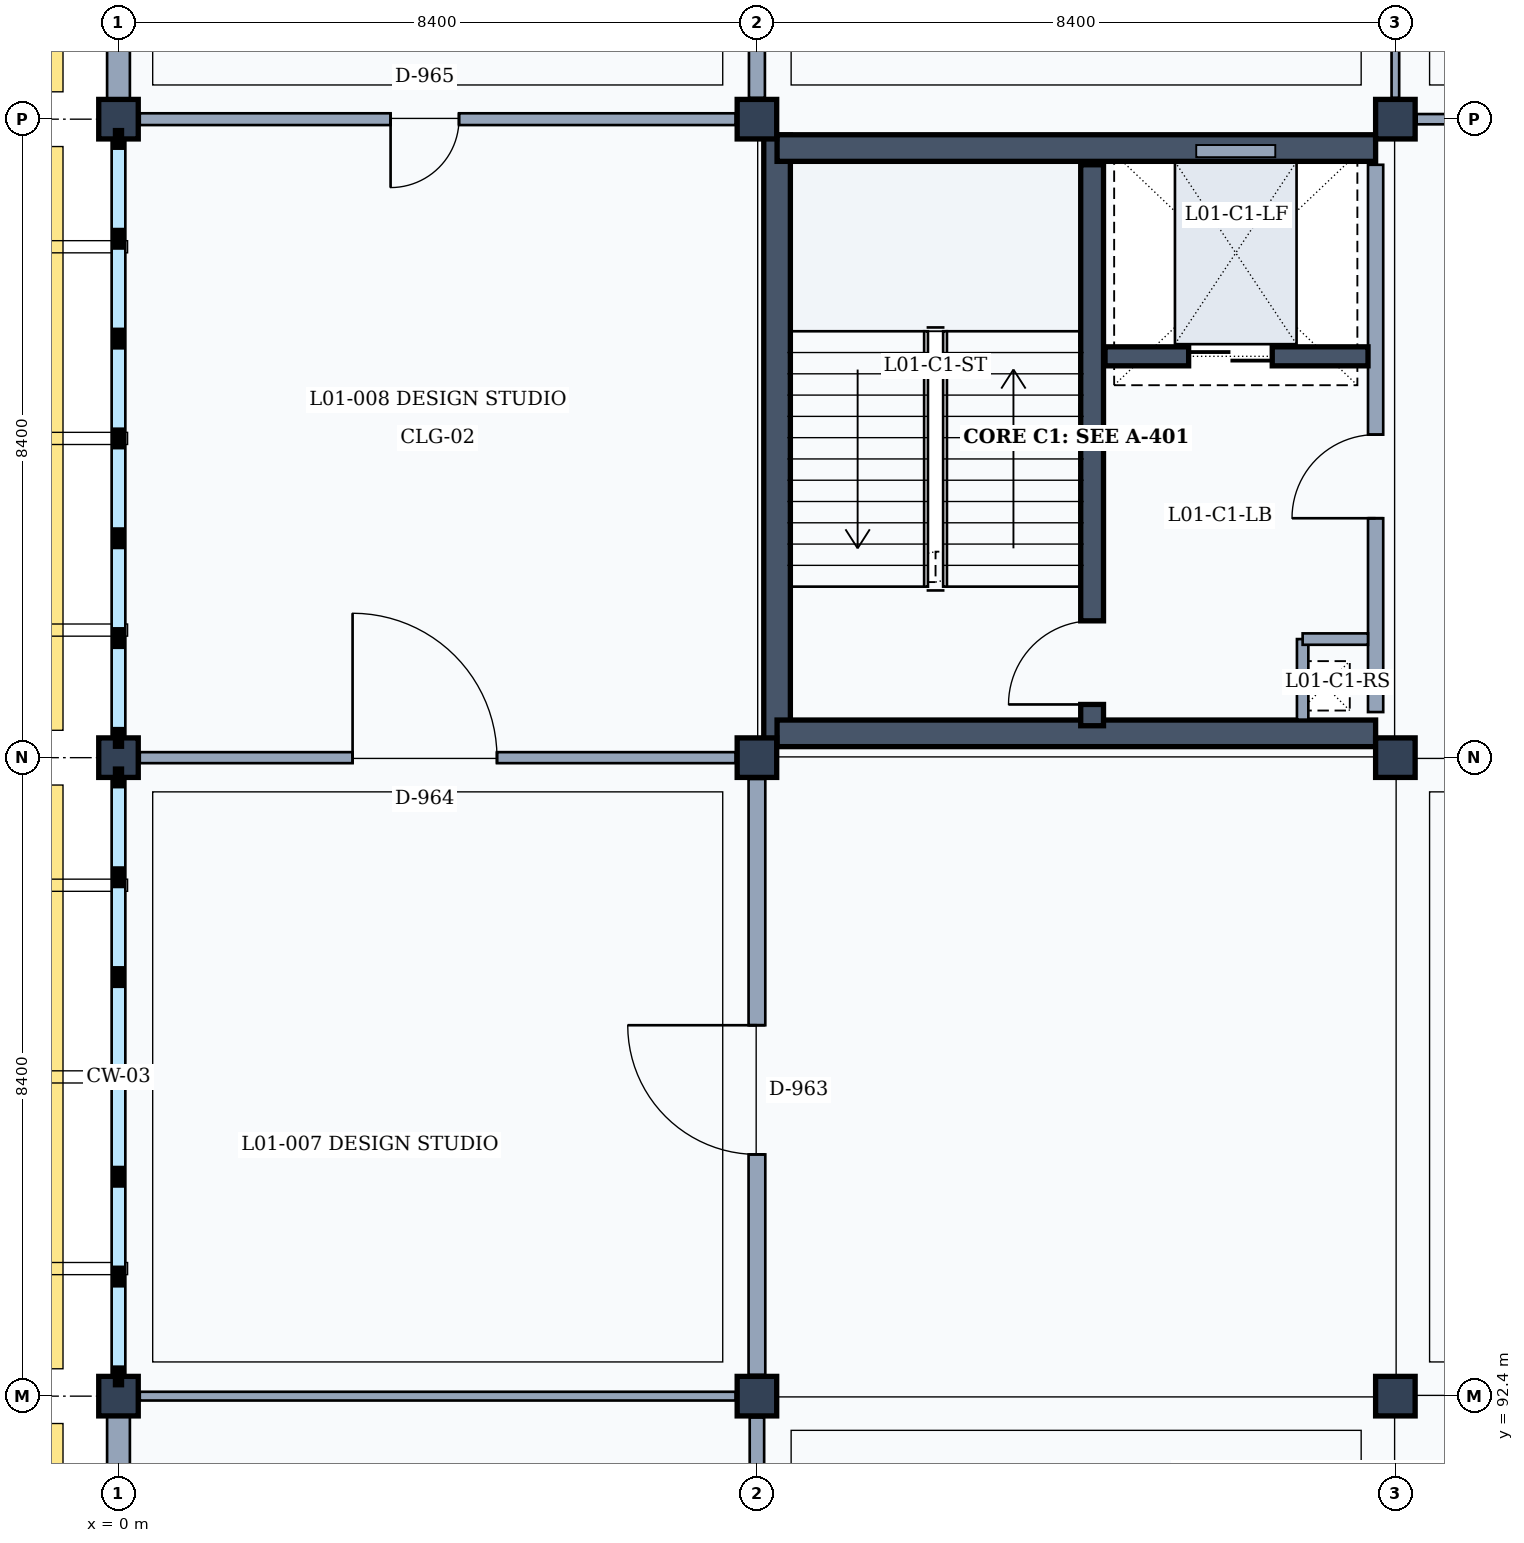
"""IFC4 building model, lengths in metres.
Left out: names, types, materials, properties, quantities, classifications, styles, units other than length and angle.
Written with IfcOpenShell. Run it as: python <this file> out.ifc"""

import sys

from ifc_helpers import new_model, si_unit, direction, frame, frame_2d, origin, origin_2d, place, context, subcontext, project, spatial, rectangle, extrude, element, fill, save


model = new_model("IFC4")
c1 = context("Model", 3, precision=1e-05, world=origin(), true_north=direction((0.0, 1.0)))
c2 = subcontext(c1, "Body", "Model", "MODEL_VIEW")
j1 = project(units=[si_unit("LENGTHUNIT", "METRE"), si_unit("PLANEANGLEUNIT", "RADIAN")], contexts=[c1])
p1 = place(None, origin())
s1 = spatial("IfcSite", under=j1, at=p1, CompositionType="ELEMENT")
p2 = place(p1, origin())
s2 = spatial("IfcBuilding", under=s1, at=p2, CompositionType="ELEMENT")
p3 = place(p2, frame((0.0, 0.0, 4.8)))
s3 = spatial("IfcBuildingStorey", under=s2, at=p3, CompositionType="ELEMENT", Elevation=4.8)
for number, where, z_axis, x_axis in (
    (1, (0.0, 92.4, 0.0), (0.0, 0.0, 1.0), (1.0, 0.0, 0.0)),
    (2, (0.0, 100.8, 0.0), (0.0, 0.0, 1.0), (1.0, 0.0, 0.0)),
    (3, (0.0, 109.2, 0.0), (0.0, 0.0, 1.0), (1.0, 0.0, 0.0)),
    (4, (8.4, 92.4, 0.0), (0.0, 0.0, 1.0), (1.0, 0.0, 0.0)),
    (5, (8.4, 100.8, 0.0), (0.0, 0.0, 1.0), (1.0, 0.0, 0.0)),
    (6, (8.4, 109.2, 0.0), (0.0, 0.0, 1.0), (1.0, 0.0, 0.0)),
    (7, (16.8, 92.4, 0.0), (0.0, 0.0, 1.0), (1.0, 0.0, 0.0)),
    (8, (16.8, 100.8, 0.0), (0.0, 0.0, 1.0), (1.0, 0.0, 0.0)),
    (9, (16.8, 109.2, 0.0), (0.0, 0.0, 1.0), (1.0, 0.0, 0.0)),
):
    element("IfcColumn", number, at=place(p3, frame(where, z_axis=z_axis, x_axis=x_axis)), inside=s3, PredefinedType="COLUMN", context=c2, shape_type="SweptSolid", body=[
        extrude(rectangle(XDim=0.52, YDim=0.52, at=origin_2d()), origin(), (0.0, 0.0, 1.0), 4.8),
    ])
p4 = place(p3, frame((0.0, 84.26, 0.0), z_axis=(0.0, 0.0, 1.0), x_axis=(0.0, 1.0, 0.0)))
e10 = element("IfcWall", 10, at=p4, inside=s3, PredefinedType="SOLIDWALL", context=c2, shape_type="SweptSolid", body=[
    extrude(rectangle(XDim=7.88, YDim=0.3, at=frame_2d((3.94, 0.0))), origin(), (0.0, 0.0, 1.0), 3.96),
])
p5 = place(p4, frame((3.29, 0.0, 0.9)))
e11 = element("IfcOpeningElement", 11, at=p5, cuts=e10, PredefinedType="OPENING", context=c2, shape_type="SweptSolid", body=[
    extrude(rectangle(XDim=1.3, YDim=1.75, at=frame_2d((0.65, 0.875))), frame((0.0, 0.16, 0.0), z_axis=(0.0, -1.0, 0.0), x_axis=(1.0, 0.0, 0.0)), (0.0, 0.0, 1.0), 0.32),
])
p6 = place(p3, frame((0.0, 109.46, 0.0), z_axis=(0.0, 0.0, 1.0), x_axis=(0.0, 1.0, 0.0)))
e12 = element("IfcWall", 12, at=p6, inside=s3, PredefinedType="SOLIDWALL", context=c2, shape_type="SweptSolid", body=[
    extrude(rectangle(XDim=7.88, YDim=0.3, at=frame_2d((3.94, 0.0))), origin(), (0.0, 0.0, 1.0), 3.96),
])
p7 = place(p6, frame((2.99, 0.0, 0.9)))
e13 = element("IfcOpeningElement", 13, at=p7, cuts=e12, PredefinedType="OPENING", context=c2, shape_type="SweptSolid", body=[
    extrude(rectangle(XDim=1.9, YDim=2.05, at=frame_2d((0.95, 1.025))), frame((0.0, 0.16, 0.0), z_axis=(0.0, -1.0, 0.0), x_axis=(1.0, 0.0, 0.0)), (0.0, 0.0, 1.0), 0.32),
])
p8 = place(p3, frame((8.665, 101.05, 0.0), z_axis=(0.0, 0.0, 1.0), x_axis=(0.0, 1.0, 0.0)))
e14 = element("IfcWall", 14, at=p8, inside=s3, PredefinedType="SHEAR", context=c2, shape_type="SweptSolid", body=[
    extrude(rectangle(XDim=7.94, YDim=0.35, at=frame_2d((3.97, 0.0))), origin(), (0.0, 0.0, 1.0), 4.56),
])
p9 = place(p3, frame((8.665, 108.82, 0.0), z_axis=(0.0, 0.0, 1.0), x_axis=(1.0, 0.0, 0.0)))
e15 = element("IfcWall", 15, at=p9, inside=s3, PredefinedType="SHEAR", context=c2, shape_type="SweptSolid", body=[
    extrude(rectangle(XDim=7.875, YDim=0.35, at=frame_2d((3.938, 0.0))), origin(), (0.0, 0.0, 1.0), 4.56),
])
p10 = place(p3, frame((16.54, 108.6, 0.0), z_axis=(0.0, 0.0, 1.0), x_axis=(0.0, -1.0, 0.0)))
e16 = element("IfcWall", 16, at=p10, inside=s3, PredefinedType="PARTITIONING", context=c2, shape_type="SweptSolid", body=[
    extrude(rectangle(XDim=7.2, YDim=0.2, at=frame_2d((3.6, 0.0))), origin(), (0.0, 0.0, 1.0), 3.92),
])
p11 = place(p10, frame((3.55, 0.0, 0.0)))
e17 = element("IfcOpeningElement", 17, at=p11, cuts=e16, PredefinedType="OPENING", context=c2, shape_type="SweptSolid", body=[
    extrude(rectangle(XDim=1.1, YDim=2.15, at=frame_2d((0.55, 1.075))), frame((0.0, 0.11, 0.0), z_axis=(0.0, -1.0, 0.0), x_axis=(1.0, 0.0, 0.0)), (0.0, 0.0, 1.0), 0.22),
])
p12 = place(p3, frame((16.54, 101.12, 0.0), z_axis=(0.0, 0.0, 1.0), x_axis=(-1.0, 0.0, 0.0)))
e18 = element("IfcWall", 18, at=p12, inside=s3, PredefinedType="SHEAR", context=c2, shape_type="SweptSolid", body=[
    extrude(rectangle(XDim=7.875, YDim=0.35, at=frame_2d((3.938, 0.0))), origin(), (0.0, 0.0, 1.0), 4.56),
])
p13 = place(p3, frame((12.81, 101.22, 0.0), z_axis=(0.0, 0.0, 1.0), x_axis=(0.0, 1.0, 0.0)))
e19 = element("IfcWall", 19, at=p13, inside=s3, PredefinedType="SHEAR", context=c2, shape_type="SweptSolid", body=[
    extrude(rectangle(XDim=7.38, YDim=0.3, at=frame_2d((3.69, 0.0))), origin(), (0.0, 0.0, 1.0), 4.56),
])
p14 = place(p13, frame((0.28, 0.0, 0.0)))
e20 = element("IfcOpeningElement", 20, at=p14, cuts=e19, PredefinedType="OPENING", context=c2, shape_type="SweptSolid", body=[
    extrude(rectangle(XDim=1.1, YDim=2.15, at=frame_2d((0.55, 1.075))), frame((0.0, 0.16, 0.0), z_axis=(0.0, -1.0, 0.0), x_axis=(1.0, 0.0, 0.0)), (0.0, 0.0, 1.0), 0.32),
])
p15 = place(p3, frame((15.58, 102.36, 0.0), z_axis=(0.0, 0.0, 1.0), x_axis=(0.0, -1.0, 0.0)))
e21 = element("IfcWall", 21, at=p15, inside=s3, PredefinedType="PARTITIONING", context=c2, shape_type="SweptSolid", body=[
    extrude(rectangle(XDim=1.06, YDim=0.15, at=frame_2d((0.53, 0.0))), origin(), (0.0, 0.0, 1.0), 3.92),
])
p16 = place(p3, frame((15.58, 102.36, 0.0), z_axis=(0.0, 0.0, 1.0), x_axis=(1.0, 0.0, 0.0)))
e22 = element("IfcWall", 22, at=p16, inside=s3, PredefinedType="PARTITIONING", context=c2, shape_type="SweptSolid", body=[
    extrude(rectangle(XDim=0.86, YDim=0.15, at=frame_2d((0.43, 0.0))), origin(), (0.0, 0.0, 1.0), 3.92),
])
p17 = place(p3, frame((12.98, 106.08, 0.0), z_axis=(0.0, 0.0, 1.0), x_axis=(1.0, 0.0, 0.0)))
e23 = element("IfcWall", 23, at=p17, inside=s3, PredefinedType="SHEAR", context=c2, shape_type="SweptSolid", body=[
    extrude(rectangle(XDim=3.46, YDim=0.25, at=frame_2d((1.73, 0.0))), origin(), (0.0, 0.0, 1.0), 4.56),
])
p18 = place(p17, frame((1.1, 0.0, 0.0)))
e24 = element("IfcOpeningElement", 24, at=p18, cuts=e23, PredefinedType="OPENING", context=c2, shape_type="SweptSolid", body=[
    extrude(rectangle(XDim=1.1, YDim=2.15, at=frame_2d((0.55, 1.075))), frame((0.0, 0.135, 0.0), z_axis=(0.0, -1.0, 0.0), x_axis=(1.0, 0.0, 0.0)), (0.0, 0.0, 1.0), 0.27),
])
p19 = place(p3, frame((8.4, 84.28, 0.0), z_axis=(0.0, 0.0, 1.0), x_axis=(0.0, 1.0, 0.0)))
e25 = element("IfcWall", 25, at=p19, inside=s3, PredefinedType="PARTITIONING", context=c2, shape_type="SweptSolid", body=[
    extrude(rectangle(XDim=7.84, YDim=0.19, at=frame_2d((3.92, 0.0))), origin(), (0.0, 0.0, 1.0), 3.92),
])
p20 = place(p19, frame((2.975, 0.0, 0.0)))
e26 = element("IfcOpeningElement", 26, at=p20, cuts=e25, PredefinedType="OPENING", context=c2, shape_type="SweptSolid", body=[
    extrude(rectangle(XDim=1.55, YDim=2.35, at=frame_2d((0.775, 1.175))), frame((0.0, 0.105, 0.0), z_axis=(0.0, -1.0, 0.0), x_axis=(1.0, 0.0, 0.0)), (0.0, 0.0, 1.0), 0.21),
])
p21 = place(p3, frame((0.28, 92.4, 0.0), z_axis=(0.0, 0.0, 1.0), x_axis=(1.0, 0.0, 0.0)))
e27 = element("IfcWall", 27, at=p21, inside=s3, PredefinedType="PARTITIONING", context=c2, shape_type="SweptSolid", body=[
    extrude(rectangle(XDim=7.84, YDim=0.115, at=frame_2d((3.92, 0.0))), origin(), (0.0, 0.0, 1.0), 3.92),
])
p22 = place(p3, frame((8.4, 92.68, 0.0), z_axis=(0.0, 0.0, 1.0), x_axis=(0.0, 1.0, 0.0)))
e28 = element("IfcWall", 28, at=p22, inside=s3, PredefinedType="PARTITIONING", context=c2, shape_type="SweptSolid", body=[
    extrude(rectangle(XDim=7.84, YDim=0.22, at=frame_2d((3.92, 0.0))), origin(), (0.0, 0.0, 1.0), 3.92),
])
p23 = place(p22, frame((2.9, 0.0, 0.0)))
e29 = element("IfcOpeningElement", 29, at=p23, cuts=e28, PredefinedType="OPENING", context=c2, shape_type="SweptSolid", body=[
    extrude(rectangle(XDim=1.7, YDim=2.3, at=frame_2d((0.85, 1.15))), frame((0.0, 0.12, 0.0), z_axis=(0.0, -1.0, 0.0), x_axis=(1.0, 0.0, 0.0)), (0.0, 0.0, 1.0), 0.24),
])
p24 = place(p3, frame((0.28, 100.8, 0.0), z_axis=(0.0, 0.0, 1.0), x_axis=(1.0, 0.0, 0.0)))
e30 = element("IfcWall", 30, at=p24, inside=s3, PredefinedType="PARTITIONING", context=c2, shape_type="SweptSolid", body=[
    extrude(rectangle(XDim=7.84, YDim=0.145, at=frame_2d((3.92, 0.0))), origin(), (0.0, 0.0, 1.0), 3.92),
])
p25 = place(p24, frame((2.8, 0.0, 0.0)))
e31 = element("IfcOpeningElement", 31, at=p25, cuts=e30, PredefinedType="OPENING", context=c2, shape_type="SweptSolid", body=[
    extrude(rectangle(XDim=1.9, YDim=2.4, at=frame_2d((0.95, 1.2))), frame((0.0, 0.083, 0.0), z_axis=(0.0, -1.0, 0.0), x_axis=(1.0, 0.0, 0.0)), (0.0, 0.0, 1.0), 0.165),
])
p26 = place(p3, frame((0.28, 109.2, 0.0), z_axis=(0.0, 0.0, 1.0), x_axis=(1.0, 0.0, 0.0)))
e32 = element("IfcWall", 32, at=p26, inside=s3, PredefinedType="PARTITIONING", context=c2, shape_type="SweptSolid", body=[
    extrude(rectangle(XDim=7.84, YDim=0.155, at=frame_2d((3.92, 0.0))), origin(), (0.0, 0.0, 1.0), 3.92),
])
p27 = place(p26, frame((3.3, 0.0, 0.0)))
e33 = element("IfcOpeningElement", 33, at=p27, cuts=e32, PredefinedType="OPENING", context=c2, shape_type="SweptSolid", body=[
    extrude(rectangle(XDim=0.9, YDim=2.1, at=frame_2d((0.45, 1.05))), frame((0.0, 0.087, 0.0), z_axis=(0.0, -1.0, 0.0), x_axis=(1.0, 0.0, 0.0)), (0.0, 0.0, 1.0), 0.175),
])
p28 = place(p3, frame((8.4, 109.48, 0.0), z_axis=(0.0, 0.0, 1.0), x_axis=(0.0, 1.0, 0.0)))
e34 = element("IfcWall", 34, at=p28, inside=s3, PredefinedType="PARTITIONING", context=c2, shape_type="SweptSolid", body=[
    extrude(rectangle(XDim=7.84, YDim=0.21, at=frame_2d((3.92, 0.0))), origin(), (0.0, 0.0, 1.0), 3.92),
])
p29 = place(p3, frame((16.8, 109.48, 0.0), z_axis=(0.0, 0.0, 1.0), x_axis=(0.0, 1.0, 0.0)))
e35 = element("IfcWall", 35, at=p29, inside=s3, PredefinedType="MOVABLE", context=c2, shape_type="SweptSolid", body=[
    extrude(rectangle(XDim=7.84, YDim=0.1, at=frame_2d((3.92, 0.0))), origin(), (0.0, 0.0, 1.0), 3.92),
])
p30 = place(p29, frame((3.15, 0.0, 0.0)))
e36 = element("IfcOpeningElement", 36, at=p30, cuts=e35, PredefinedType="OPENING", context=c2, shape_type="SweptSolid", body=[
    extrude(rectangle(XDim=1.2, YDim=2.2, at=frame_2d((0.6, 1.1))), frame((0.0, 0.06, 0.0), z_axis=(0.0, -1.0, 0.0), x_axis=(1.0, 0.0, 0.0)), (0.0, 0.0, 1.0), 0.12),
])
p31 = place(p3, frame((17.08, 109.2, 0.0), z_axis=(0.0, 0.0, 1.0), x_axis=(1.0, 0.0, 0.0)))
e37 = element("IfcWall", 37, at=p31, inside=s3, PredefinedType="PARTITIONING", context=c2, shape_type="SweptSolid", body=[
    extrude(rectangle(XDim=7.84, YDim=0.135, at=frame_2d((3.92, 0.0))), origin(), (0.0, 0.0, 1.0), 3.92),
])
p32 = place(p31, frame((3.3, 0.0, 0.0)))
e38 = element("IfcOpeningElement", 38, at=p32, cuts=e37, PredefinedType="OPENING", context=c2, shape_type="SweptSolid", body=[
    extrude(rectangle(XDim=0.9, YDim=2.1, at=frame_2d((0.45, 1.05))), frame((0.0, 0.077, 0.0), z_axis=(0.0, -1.0, 0.0), x_axis=(1.0, 0.0, 0.0)), (0.0, 0.0, 1.0), 0.155),
])
p33 = place(p11, frame((1.1, 0.0, 0.0), z_axis=(0.0, 0.0, 1.0), x_axis=(-1.0, 0.0, 0.0)))
e39 = element("IfcDoor", 39, at=p33, inside=s3, OperationType="SINGLE_SWING_LEFT", PredefinedType="DOOR", context=c2, shape_type="SweptSolid", body=[
    extrude(rectangle(XDim=1.1, YDim=2.15, at=frame_2d((0.55, 1.075))), frame((0.0, 0.025, 0.0), z_axis=(0.0, -1.0, 0.0), x_axis=(1.0, 0.0, 0.0)), (0.0, 0.0, 1.0), 0.05),
])
fill(e17, e39)
p34 = place(p14, origin())
e40 = element("IfcDoor", 40, at=p34, inside=s3, OperationType="SINGLE_SWING_LEFT", PredefinedType="DOOR", context=c2, shape_type="SweptSolid", body=[
    extrude(rectangle(XDim=1.1, YDim=2.15, at=frame_2d((0.55, 1.075))), frame((0.0, 0.025, 0.0), z_axis=(0.0, -1.0, 0.0), x_axis=(1.0, 0.0, 0.0)), (0.0, 0.0, 1.0), 0.05),
])
fill(e20, e40)
p35 = place(p18, origin())
e41 = element("IfcDoor", 41, at=p35, inside=s3, OperationType="DOUBLE_DOOR_SLIDING", PredefinedType="DOOR", context=c2, shape_type="SweptSolid", body=[
    extrude(rectangle(XDim=1.1, YDim=2.15, at=frame_2d((0.55, 1.075))), frame((0.0, 0.025, 0.0), z_axis=(0.0, -1.0, 0.0), x_axis=(1.0, 0.0, 0.0)), (0.0, 0.0, 1.0), 0.05),
])
fill(e24, e41)
p36 = place(p23, origin())
e42 = element("IfcDoor", 42, at=p36, inside=s3, OperationType="SINGLE_SWING_RIGHT", PredefinedType="DOOR", context=c2, shape_type="SweptSolid", body=[
    extrude(rectangle(XDim=1.7, YDim=2.3, at=frame_2d((0.85, 1.15))), frame((0.0, 0.025, 0.0), z_axis=(0.0, -1.0, 0.0), x_axis=(1.0, 0.0, 0.0)), (0.0, 0.0, 1.0), 0.05),
])
fill(e29, e42)
p37 = place(p25, origin())
e43 = element("IfcDoor", 43, at=p37, inside=s3, OperationType="SINGLE_SWING_LEFT", PredefinedType="DOOR", context=c2, shape_type="SweptSolid", body=[
    extrude(rectangle(XDim=1.9, YDim=2.4, at=frame_2d((0.95, 1.2))), frame((0.0, 0.025, 0.0), z_axis=(0.0, -1.0, 0.0), x_axis=(1.0, 0.0, 0.0)), (0.0, 0.0, 1.0), 0.05),
])
fill(e31, e43)
p38 = place(p27, frame((0.9, 0.0, 0.0), z_axis=(0.0, 0.0, 1.0), x_axis=(-1.0, 0.0, 0.0)))
e44 = element("IfcDoor", 44, at=p38, inside=s3, OperationType="SINGLE_SWING_RIGHT", PredefinedType="DOOR", context=c2, shape_type="SweptSolid", body=[
    extrude(rectangle(XDim=0.9, YDim=2.1, at=frame_2d((0.45, 1.05))), frame((0.0, 0.025, 0.0), z_axis=(0.0, -1.0, 0.0), x_axis=(1.0, 0.0, 0.0)), (0.0, 0.0, 1.0), 0.05),
])
fill(e33, e44)
save(model, sys.argv[1])
